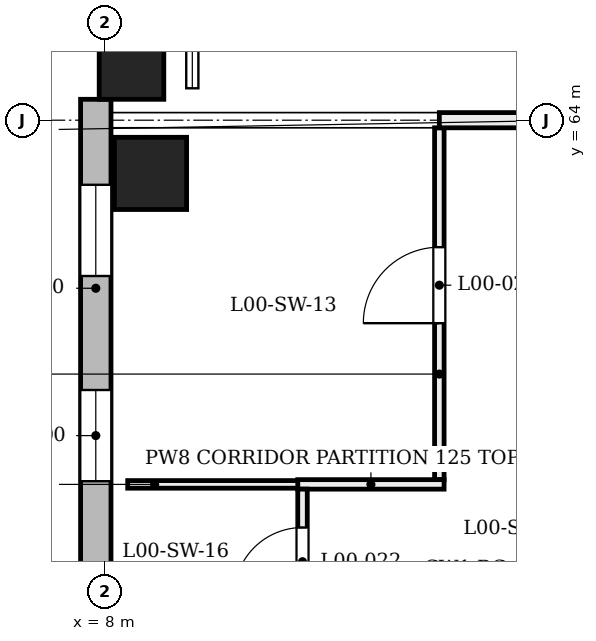
"""IFC4 building model, lengths in metres.
Left out: names, types, materials, properties, quantities, classifications, styles, units other than length and angle.
Written with IfcOpenShell. Run it as: python <this file> out.ifc"""

import sys

from ifc_helpers import new_model, si_unit, direction, frame, frame_2d, origin, origin_2d, place, context, subcontext, project, spatial, rectangle, extrude, element, fill, save


model = new_model("IFC4")
c1 = context("Model", 3, precision=1e-05, world=origin(), true_north=direction((0.0, 1.0)))
c2 = subcontext(c1, "Body", "Model", "MODEL_VIEW")
j1 = project(units=[si_unit("LENGTHUNIT", "METRE"), si_unit("PLANEANGLEUNIT", "RADIAN")], contexts=[c1])
p1 = place(None, origin())
s1 = spatial("IfcSite", under=j1, at=p1, CompositionType="ELEMENT")
p2 = place(p1, origin())
s2 = spatial("IfcBuilding", under=s1, at=p2, CompositionType="ELEMENT")
p3 = place(p2, origin())
s3 = spatial("IfcBuildingStorey", under=s2, at=p3, CompositionType="ELEMENT", Elevation=0.0)
p4 = place(p3, frame((8.6, 63.3, 0.0), z_axis=(0.0, 0.0, 1.0), x_axis=(1.0, 0.0, 0.0)))
e1 = element("IfcColumn", 1, at=p4, inside=s3, PredefinedType="COLUMN", context=c2, shape_type="SweptSolid", body=[
    extrude(rectangle(XDim=0.95, YDim=0.95, at=origin_2d()), origin(), (0.0, 0.0, 1.0), 4.8),
])
p5 = place(p3, frame((8.933, 64.7, -1.6), z_axis=(-0.203937849881, 0.0, 0.978983837142), x_axis=(0.0, -1.0, 0.0)))
e2 = element("IfcColumn", 2, at=p5, inside=s3, PredefinedType="COLUMN", context=c2, shape_type="SweptSolid", body=[
    extrude(rectangle(XDim=0.85, YDim=0.85, at=origin_2d()), origin(), (0.0, 0.0, 1.0), 6.538),
])
p6 = place(p3, frame((7.88, 47.7, 0.0), z_axis=(0.0, 0.0, 1.0), x_axis=(0.0, 1.0, 0.0)))
e3 = element("IfcWall", 3, at=p6, inside=s3, PredefinedType="SOLIDWALL", context=c2, shape_type="SweptSolid", body=[
    extrude(rectangle(XDim=16.575, YDim=0.4, at=frame_2d((8.288, 0.0))), origin(), (0.0, 0.0, 1.0), 3.9),
])
p7 = place(p6, frame((0.75, 0.0, 1.9)))
e4 = element("IfcOpeningElement", 4, at=p7, cuts=e3, PredefinedType="OPENING", context=c2, shape_type="SweptSolid", body=[
    extrude(rectangle(XDim=1.2, YDim=1.5, at=frame_2d((0.6, 0.75))), frame((0.0, 0.21, 0.0), z_axis=(0.0, -1.0, 0.0), x_axis=(1.0, 0.0, 0.0)), (0.0, 0.0, 1.0), 0.42),
])
p8 = place(p6, frame((3.45, 0.0, 1.9)))
e5 = element("IfcOpeningElement", 5, at=p8, cuts=e3, PredefinedType="OPENING", context=c2, shape_type="SweptSolid", body=[
    extrude(rectangle(XDim=1.2, YDim=1.5, at=frame_2d((0.6, 0.75))), frame((0.0, 0.21, 0.0), z_axis=(0.0, -1.0, 0.0), x_axis=(1.0, 0.0, 0.0)), (0.0, 0.0, 1.0), 0.42),
])
p9 = place(p6, frame((6.15, 0.0, 1.9)))
e6 = element("IfcOpeningElement", 6, at=p9, cuts=e3, PredefinedType="OPENING", context=c2, shape_type="SweptSolid", body=[
    extrude(rectangle(XDim=1.2, YDim=1.5, at=frame_2d((0.6, 0.75))), frame((0.0, 0.21, 0.0), z_axis=(0.0, -1.0, 0.0), x_axis=(1.0, 0.0, 0.0)), (0.0, 0.0, 1.0), 0.42),
])
p10 = place(p6, frame((8.85, 0.0, 1.9)))
e7 = element("IfcOpeningElement", 7, at=p10, cuts=e3, PredefinedType="OPENING", context=c2, shape_type="SweptSolid", body=[
    extrude(rectangle(XDim=1.2, YDim=1.5, at=frame_2d((0.6, 0.75))), frame((0.0, 0.21, 0.0), z_axis=(0.0, -1.0, 0.0), x_axis=(1.0, 0.0, 0.0)), (0.0, 0.0, 1.0), 0.42),
])
p11 = place(p6, frame((11.55, 0.0, 1.9)))
e8 = element("IfcOpeningElement", 8, at=p11, cuts=e3, PredefinedType="OPENING", context=c2, shape_type="SweptSolid", body=[
    extrude(rectangle(XDim=1.2, YDim=1.5, at=frame_2d((0.6, 0.75))), frame((0.0, 0.21, 0.0), z_axis=(0.0, -1.0, 0.0), x_axis=(1.0, 0.0, 0.0)), (0.0, 0.0, 1.0), 0.42),
])
p12 = place(p6, frame((14.25, 0.0, 1.9)))
e9 = element("IfcOpeningElement", 9, at=p12, cuts=e3, PredefinedType="OPENING", context=c2, shape_type="SweptSolid", body=[
    extrude(rectangle(XDim=1.2, YDim=1.5, at=frame_2d((0.6, 0.75))), frame((0.0, 0.21, 0.0), z_axis=(0.0, -1.0, 0.0), x_axis=(1.0, 0.0, 0.0)), (0.0, 0.0, 1.0), 0.42),
])
p13 = place(p3, frame((12.4, 59.271, 0.0), z_axis=(0.0, 0.0, 1.0), x_axis=(0.0, 1.0, 0.0)))
e10 = element("IfcWall", 10, at=p13, inside=s3, PredefinedType="PARTITIONING", context=c2, shape_type="SweptSolid", body=[
    extrude(rectangle(XDim=4.629, YDim=0.125, at=frame_2d((2.314, 0.0))), origin(), (0.0, 0.0, 1.0), 3.88),
])
p14 = place(p13, frame((2.058, 0.0, 0.0)))
e11 = element("IfcOpeningElement", 11, at=p14, cuts=e10, PredefinedType="OPENING", context=c2, shape_type="SweptSolid", body=[
    extrude(rectangle(XDim=1.0, YDim=2.1, at=frame_2d((0.5, 1.05))), frame((0.0, 0.073, 0.0), z_axis=(0.0, -1.0, 0.0), x_axis=(1.0, 0.0, 0.0)), (0.0, 0.0, 1.0), 0.145),
])
p15 = place(p3, frame((8.3, 59.208, 0.0), z_axis=(0.0, 0.0, 1.0), x_axis=(1.0, 0.0, 0.0)))
e12 = element("IfcWall", 12, at=p15, inside=s3, PredefinedType="PARTITIONING", context=c2, shape_type="SweptSolid", body=[
    extrude(rectangle(XDim=2.363, YDim=0.1, at=frame_2d((1.181, 0.0))), origin(), (0.0, 0.0, 1.0), 3.98),
])
p16 = place(p3, frame((10.538, 59.208, 0.0), z_axis=(0.0, 0.0, 1.0), x_axis=(1.0, 0.0, 0.0)))
e13 = element("IfcWall", 13, at=p16, inside=s3, PredefinedType="PARTITIONING", context=c2, shape_type="SweptSolid", body=[
    extrude(rectangle(XDim=1.925, YDim=0.125, at=frame_2d((0.962, 0.0))), origin(), (0.0, 0.0, 1.0), 4.56),
])
p17 = place(p3, frame((10.6, 54.423, 0.0), z_axis=(0.0, 0.0, 1.0), x_axis=(0.0, 1.0, 0.0)))
e14 = element("IfcWall", 14, at=p17, inside=s3, PredefinedType="PARTITIONING", context=c2, shape_type="SweptSolid", body=[
    extrude(rectangle(XDim=4.723, YDim=0.125, at=frame_2d((2.362, 0.0))), origin(), (0.0, 0.0, 1.0), 3.98),
])
p18 = place(p17, frame((0.894, 0.0, 0.0)))
e15 = element("IfcOpeningElement", 15, at=p18, cuts=e14, PredefinedType="OPENING", context=c2, shape_type="SweptSolid", body=[
    extrude(rectangle(XDim=0.9, YDim=2.1, at=frame_2d((0.45, 1.05))), frame((0.0, 0.073, 0.0), z_axis=(0.0, -1.0, 0.0), x_axis=(1.0, 0.0, 0.0)), (0.0, 0.0, 1.0), 0.145),
])
p19 = place(p17, frame((3.318, 0.0, 0.0)))
e16 = element("IfcOpeningElement", 16, at=p19, cuts=e14, PredefinedType="OPENING", context=c2, shape_type="SweptSolid", body=[
    extrude(rectangle(XDim=0.9, YDim=2.1, at=frame_2d((0.45, 1.05))), frame((0.0, 0.073, 0.0), z_axis=(0.0, -1.0, 0.0), x_axis=(1.0, 0.0, 0.0)), (0.0, 0.0, 1.0), 0.145),
])
p20 = place(p3, frame((12.4, 64.0, 0.0), z_axis=(0.0, 0.0, 1.0), x_axis=(1.0, 0.0, 0.0)))
e17 = element("IfcWall", 17, at=p20, inside=s3, PredefinedType="PARTITIONING", context=c2, shape_type="SweptSolid", body=[
    extrude(rectangle(XDim=3.6, YDim=0.2, at=frame_2d((1.8, 0.0))), origin(), (0.0, 0.0, 1.0), 3.88),
])
p21 = place(p20, frame((1.05, 0.0, 0.0)))
e18 = element("IfcOpeningElement", 18, at=p21, cuts=e17, PredefinedType="OPENING", context=c2, shape_type="SweptSolid", body=[
    extrude(rectangle(XDim=1.0, YDim=2.1, at=frame_2d((0.5, 1.05))), frame((0.0, 0.11, 0.0), z_axis=(0.0, -1.0, 0.0), x_axis=(1.0, 0.0, 0.0)), (0.0, 0.0, 1.0), 0.22),
])
p22 = place(p11, origin())
e19 = element("IfcWindow", 19, at=p22, inside=s3, PartitioningType="SINGLE_PANEL", PredefinedType="WINDOW", context=c2, shape_type="SweptSolid", body=[
    extrude(rectangle(XDim=1.2, YDim=1.5, at=frame_2d((0.6, 0.75))), frame((0.0, 0.03, 0.0), z_axis=(0.0, -1.0, 0.0), x_axis=(1.0, 0.0, 0.0)), (0.0, 0.0, 1.0), 0.06),
])
fill(e8, e19)
p23 = place(p12, origin())
e20 = element("IfcWindow", 20, at=p23, inside=s3, PartitioningType="SINGLE_PANEL", PredefinedType="WINDOW", context=c2, shape_type="SweptSolid", body=[
    extrude(rectangle(XDim=1.2, YDim=1.5, at=frame_2d((0.6, 0.75))), frame((0.0, 0.03, 0.0), z_axis=(0.0, -1.0, 0.0), x_axis=(1.0, 0.0, 0.0)), (0.0, 0.0, 1.0), 0.06),
])
fill(e9, e20)
p24 = place(p14, origin())
e21 = element("IfcDoor", 21, at=p24, inside=s3, OperationType="SINGLE_SWING_LEFT", PredefinedType="DOOR", context=c2, shape_type="SweptSolid", body=[
    extrude(rectangle(XDim=1.0, YDim=2.1, at=frame_2d((0.5, 1.05))), frame((0.0, 0.025, 0.0), z_axis=(0.0, -1.0, 0.0), x_axis=(1.0, 0.0, 0.0)), (0.0, 0.0, 1.0), 0.05),
])
fill(e11, e21)
p25 = place(p19, origin())
e22 = element("IfcDoor", 22, at=p25, inside=s3, OperationType="SINGLE_SWING_LEFT", PredefinedType="DOOR", context=c2, shape_type="SweptSolid", body=[
    extrude(rectangle(XDim=0.9, YDim=2.1, at=frame_2d((0.45, 1.05))), frame((0.0, 0.025, 0.0), z_axis=(0.0, -1.0, 0.0), x_axis=(1.0, 0.0, 0.0)), (0.0, 0.0, 1.0), 0.05),
])
fill(e16, e22)
save(model, sys.argv[1])
